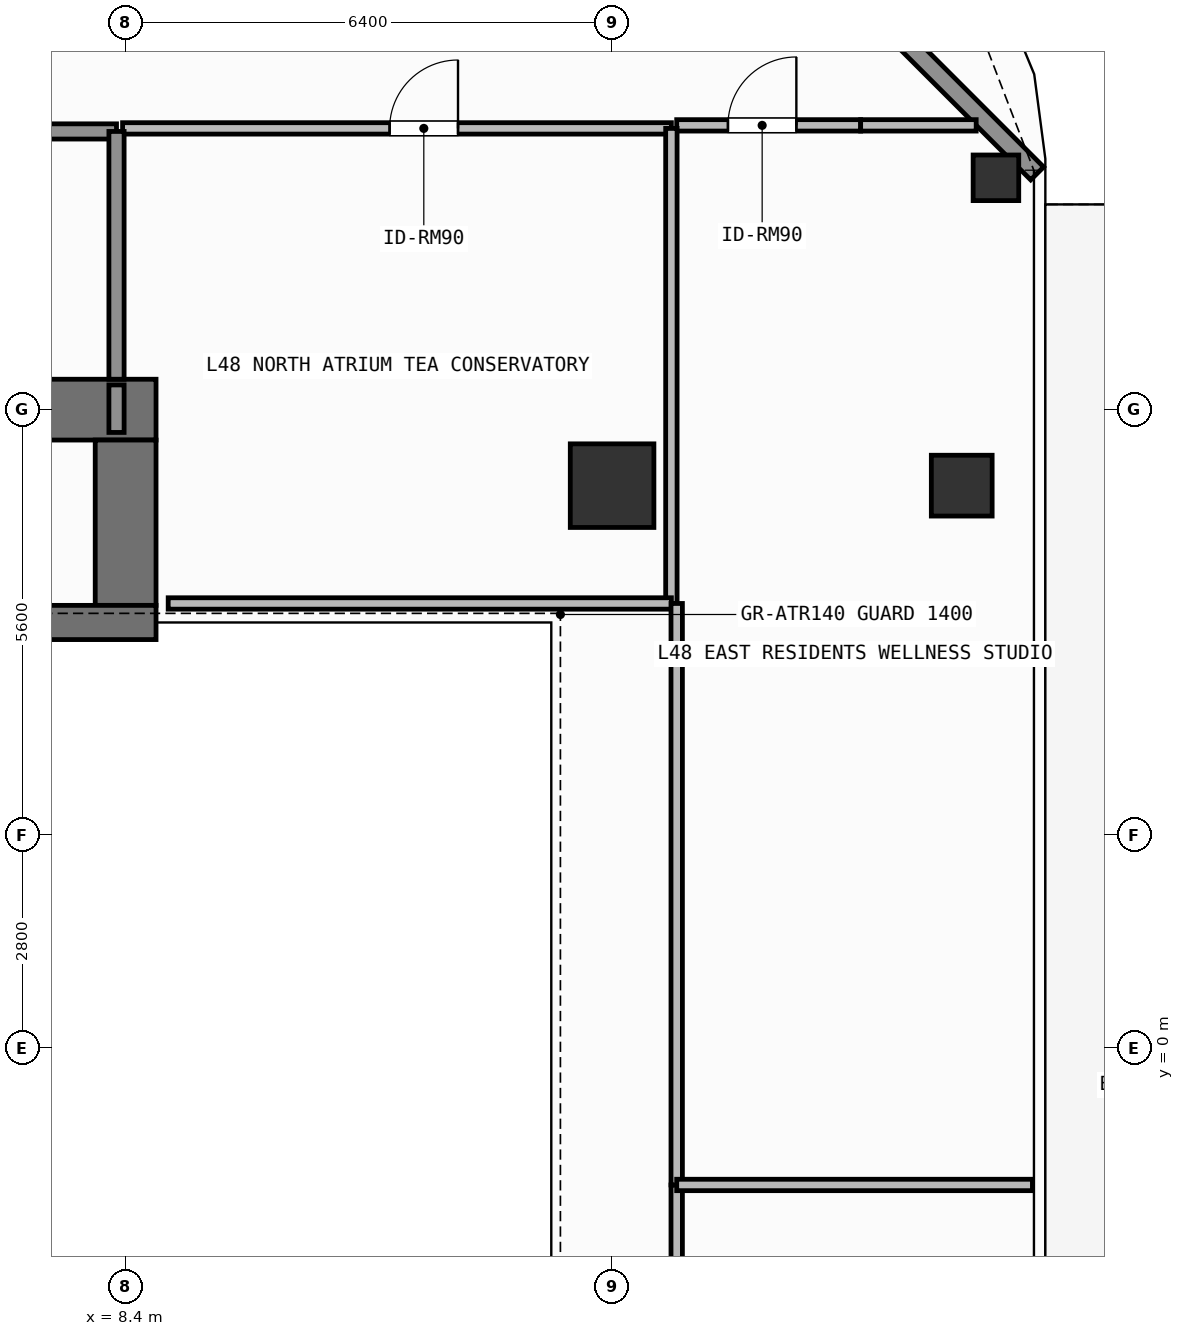
"""IFC4 building model, lengths in metres.
Left out: names, types, materials, properties, quantities, classifications, styles, units other than length and angle.
Written with IfcOpenShell. Run it as: python <this file> out.ifc"""

import sys

from ifc_helpers import new_model, si_unit, direction, frame, frame_2d, origin, origin_2d, place, context, subcontext, project, spatial, rectangle, hollow_rectangle, extrude, element, fill, save


model = new_model("IFC4")
c1 = context("Model", 3, precision=1e-05, world=origin(), true_north=direction((0.0, 1.0)))
c2 = subcontext(c1, "Body", "Model", "MODEL_VIEW")
j1 = project(units=[si_unit("LENGTHUNIT", "METRE"), si_unit("PLANEANGLEUNIT", "RADIAN")], contexts=[c1])
p1 = place(None, origin())
s1 = spatial("IfcSite", under=j1, at=p1, CompositionType="ELEMENT")
p2 = place(p1, origin())
s2 = spatial("IfcBuilding", under=s1, at=p2, CompositionType="ELEMENT")
p3 = place(p2, frame((0.0, 0.0, 195.3)))
s3 = spatial("IfcBuildingStorey", under=s2, at=p3, CompositionType="ELEMENT", Elevation=195.3)
p4 = place(p3, frame((-7.55, 8.4, 0.0), z_axis=(0.0, 0.0, 1.0), x_axis=(1.0, 0.0, 0.0)))
e1 = element("IfcWall", 1, at=p4, inside=s3, PredefinedType="SHEAR", context=c2, shape_type="SweptSolid", body=[
    extrude(rectangle(XDim=16.35, YDim=0.8, at=frame_2d((8.175, 0.0))), origin(), (0.0, 0.0, 1.0), 3.9),
])
p5 = place(p3, frame((8.4, 5.825, 0.0), z_axis=(0.0, 0.0, 1.0), x_axis=(0.0, 1.0, 0.0)))
e2 = element("IfcWall", 2, at=p5, inside=s3, PredefinedType="SHEAR", context=c2, shape_type="SweptSolid", body=[
    extrude(rectangle(XDim=2.175, YDim=0.8, at=frame_2d((1.087, 0.0))), origin(), (0.0, 0.0, 1.0), 3.9),
])
p6 = place(p3, frame((3.045, 5.6, 0.0), z_axis=(0.0, 0.0, 1.0), x_axis=(1.0, 0.0, 0.0)))
e3 = element("IfcWall", 3, at=p6, inside=s3, PredefinedType="SHEAR", context=c2, shape_type="SweptSolid", body=[
    extrude(rectangle(XDim=5.755, YDim=0.45, at=frame_2d((2.877, 0.0))), origin(), (0.0, 0.0, 1.0), 3.9),
])
p7 = place(p3, frame((14.8, 7.4, 0.0), z_axis=(0.0, 0.0, 1.0), x_axis=(1.0, 0.0, 0.0)))
e4 = element("IfcColumn", 4, at=p7, inside=s3, PredefinedType="COLUMN", context=c2, shape_type="SweptSolid", body=[
    extrude(rectangle(XDim=1.1, YDim=1.1, at=origin_2d()), origin(), (0.0, 0.0, 1.0), 3.9),
])
p8 = place(p3, frame((19.4, 7.4, 0.0), z_axis=(0.0, 0.0, 1.0), x_axis=(1.0, 0.0, 0.0)))
e5 = element("IfcColumn", 5, at=p8, inside=s3, PredefinedType="COLUMN", context=c2, shape_type="SweptSolid", body=[
    extrude(hollow_rectangle(XDim=0.8, YDim=0.8, WallThickness=0.036, at=origin_2d()), origin(), (0.0, 0.0, 1.0), 3.9),
])
p9 = place(p3, frame((19.85, 11.45, 0.0), z_axis=(0.0, 0.0, 1.0), x_axis=(1.0, 0.0, 0.0)))
e6 = element("IfcColumn", 6, at=p9, inside=s3, PredefinedType="COLUMN", context=c2, shape_type="SweptSolid", body=[
    extrude(hollow_rectangle(XDim=0.6, YDim=0.6, WallThickness=0.028, at=origin_2d()), origin(), (0.0, 0.0, 1.0), 3.9),
])
p10 = place(p3, frame((16.008, 15.892, 0.0), z_axis=(0.0, 0.0, 1.0), x_axis=(0.707106781187, -0.707106781187, 0.0)))
e7 = element("IfcWall", 7, at=p10, inside=s3, PredefinedType="SOLIDWALL", context=c2, shape_type="SweptSolid", body=[
    extrude(rectangle(XDim=6.201, YDim=0.24, at=frame_2d((3.101, 0.0))), origin(), (0.0, 0.0, 1.0), 3.68),
])
p11 = place(p3, frame((4.58, 12.06, 0.0), z_axis=(0.0, 0.0, 1.0), x_axis=(1.0, 0.0, 0.0)))
e8 = element("IfcWall", 8, at=p11, inside=s3, PredefinedType="SOLIDWALL", context=c2, shape_type="SweptSolid", body=[
    extrude(rectangle(XDim=3.7, YDim=0.2, at=frame_2d((1.85, 0.0))), origin(), (0.0, 0.0, 1.0), 3.68),
])
p12 = place(p11, frame((1.212, 0.0, 0.0)))
e9 = element("IfcOpeningElement", 9, at=p12, cuts=e8, PredefinedType="OPENING", context=c2, shape_type="SweptSolid", body=[
    extrude(rectangle(XDim=1.1, YDim=2.15, at=frame_2d((0.55, 1.075))), frame((0.0, 0.11, 0.0), z_axis=(0.0, -1.0, 0.0), x_axis=(1.0, 0.0, 0.0)), (0.0, 0.0, 1.0), 0.22),
])
p13 = place(p3, frame((8.36, 12.1, 0.0), z_axis=(0.0, 0.0, 1.0), x_axis=(1.0, 0.0, 0.0)))
e10 = element("IfcWall", 10, at=p13, inside=s3, PredefinedType="PARTITIONING", context=c2, shape_type="SweptSolid", body=[
    extrude(rectangle(XDim=7.22, YDim=0.15, at=frame_2d((3.61, 0.0))), origin(), (0.0, 0.0, 1.0), 3.68),
])
p14 = place(p13, frame((3.513, 0.0, 0.0)))
e11 = element("IfcOpeningElement", 11, at=p14, cuts=e10, PredefinedType="OPENING", context=c2, shape_type="SweptSolid", body=[
    extrude(rectangle(XDim=0.9, YDim=2.1, at=frame_2d((0.45, 1.05))), frame((0.0, 0.085, 0.0), z_axis=(0.0, -1.0, 0.0), x_axis=(1.0, 0.0, 0.0)), (0.0, 0.0, 1.0), 0.17),
])
p15 = place(p3, frame((15.65, 12.14, 0.0), z_axis=(0.0, 0.0, 1.0), x_axis=(1.0, 0.0, 0.0)))
e12 = element("IfcWall", 12, at=p15, inside=s3, PredefinedType="PARTITIONING", context=c2, shape_type="SweptSolid", body=[
    extrude(rectangle(XDim=2.42, YDim=0.15, at=frame_2d((1.21, 0.0))), origin(), (0.0, 0.0, 1.0), 3.68),
])
p16 = place(p15, frame((0.674, 0.0, 0.0)))
e13 = element("IfcOpeningElement", 13, at=p16, cuts=e12, PredefinedType="OPENING", context=c2, shape_type="SweptSolid", body=[
    extrude(rectangle(XDim=0.9, YDim=2.1, at=frame_2d((0.45, 1.05))), frame((0.0, 0.085, 0.0), z_axis=(0.0, -1.0, 0.0), x_axis=(1.0, 0.0, 0.0)), (0.0, 0.0, 1.0), 0.17),
])
p17 = place(p3, frame((8.28, 8.8, 0.0), z_axis=(0.0, 0.0, 1.0), x_axis=(0.0, 1.0, 0.0)))
e14 = element("IfcWall", 14, at=p17, inside=s3, PredefinedType="SOLIDWALL", context=c2, shape_type="SweptSolid", body=[
    extrude(rectangle(XDim=3.26, YDim=0.2, at=frame_2d((1.63, 0.0))), origin(), (0.0, 0.0, 1.0), 3.68),
])
p18 = place(p3, frame((8.28, 8.1, 0.0), z_axis=(0.0, 0.0, 1.0), x_axis=(0.0, 1.0, 0.0)))
e15 = element("IfcWall", 15, at=p18, inside=s3, PredefinedType="SOLIDWALL", context=c2, shape_type="SweptSolid", body=[
    extrude(rectangle(XDim=0.625, YDim=0.2, at=frame_2d((0.312, 0.0))), origin(), (0.0, 0.0, 1.0), 3.68),
])
p19 = place(p3, frame((15.58, 5.85, 0.0), z_axis=(0.0, 0.0, 1.0), x_axis=(0.0, 1.0, 0.0)))
e16 = element("IfcWall", 16, at=p19, inside=s3, PredefinedType="PARTITIONING", context=c2, shape_type="SweptSolid", body=[
    extrude(rectangle(XDim=6.25, YDim=0.15, at=frame_2d((3.125, 0.0))), origin(), (0.0, 0.0, 1.0), 3.68),
])
p20 = place(p3, frame((8.96, 5.85, 0.0), z_axis=(0.0, 0.0, 1.0), x_axis=(1.0, 0.0, 0.0)))
e17 = element("IfcWall", 17, at=p20, inside=s3, PredefinedType="PARTITIONING", context=c2, shape_type="SweptSolid", body=[
    extrude(rectangle(XDim=6.62, YDim=0.15, at=frame_2d((3.31, 0.0))), origin(), (0.0, 0.0, 1.0), 3.68),
])
p21 = place(p3, frame((15.65, -5.85, 0.0), z_axis=(0.0, 0.0, 1.0), x_axis=(0.0, 1.0, 0.0)))
e18 = element("IfcWall", 18, at=p21, inside=s3, PredefinedType="PARTITIONING", context=c2, shape_type="SweptSolid", body=[
    extrude(rectangle(XDim=4.05, YDim=0.15, at=frame_2d((2.025, 0.0))), origin(), (0.0, 0.0, 1.0), 3.68),
])
p22 = place(p3, frame((15.65, -1.8, 0.0), z_axis=(0.0, 0.0, 1.0), x_axis=(0.0, 1.0, 0.0)))
e19 = element("IfcWall", 19, at=p22, inside=s3, PredefinedType="PARTITIONING", context=c2, shape_type="SweptSolid", body=[
    extrude(rectangle(XDim=7.65, YDim=0.15, at=frame_2d((3.825, 0.0))), origin(), (0.0, 0.0, 1.0), 3.68),
])
p23 = place(p3, frame((15.65, -1.8, 0.0), z_axis=(0.0, 0.0, 1.0), x_axis=(1.0, 0.0, 0.0)))
e20 = element("IfcWall", 20, at=p23, inside=s3, PredefinedType="PARTITIONING", context=c2, shape_type="SweptSolid", body=[
    extrude(rectangle(XDim=4.68, YDim=0.15, at=frame_2d((2.34, 0.0))), origin(), (0.0, 0.0, 1.0), 3.68),
])
p24 = place(p3, frame((18.07, 12.14, 0.0), z_axis=(0.0, 0.0, 1.0), x_axis=(1.0, 0.0, 0.0)))
e21 = element("IfcWall", 21, at=p24, inside=s3, PredefinedType="PARTITIONING", context=c2, shape_type="SweptSolid", body=[
    extrude(rectangle(XDim=1.52, YDim=0.15, at=frame_2d((0.76, 0.0))), origin(), (0.0, 0.0, 1.0), 3.68),
])
p25 = place(p14, origin())
e22 = element("IfcDoor", 22, at=p25, inside=s3, OperationType="SINGLE_SWING_RIGHT", PredefinedType="DOOR", context=c2, shape_type="SweptSolid", body=[
    extrude(rectangle(XDim=0.9, YDim=2.1, at=frame_2d((0.45, 1.05))), frame((0.0, 0.025, 0.0), z_axis=(0.0, -1.0, 0.0), x_axis=(1.0, 0.0, 0.0)), (0.0, 0.0, 1.0), 0.05),
])
fill(e11, e22)
p26 = place(p16, origin())
e23 = element("IfcDoor", 23, at=p26, inside=s3, OperationType="SINGLE_SWING_RIGHT", PredefinedType="DOOR", context=c2, shape_type="SweptSolid", body=[
    extrude(rectangle(XDim=0.9, YDim=2.1, at=frame_2d((0.45, 1.05))), frame((0.0, 0.025, 0.0), z_axis=(0.0, -1.0, 0.0), x_axis=(1.0, 0.0, 0.0)), (0.0, 0.0, 1.0), 0.05),
])
fill(e13, e23)
save(model, sys.argv[1])
